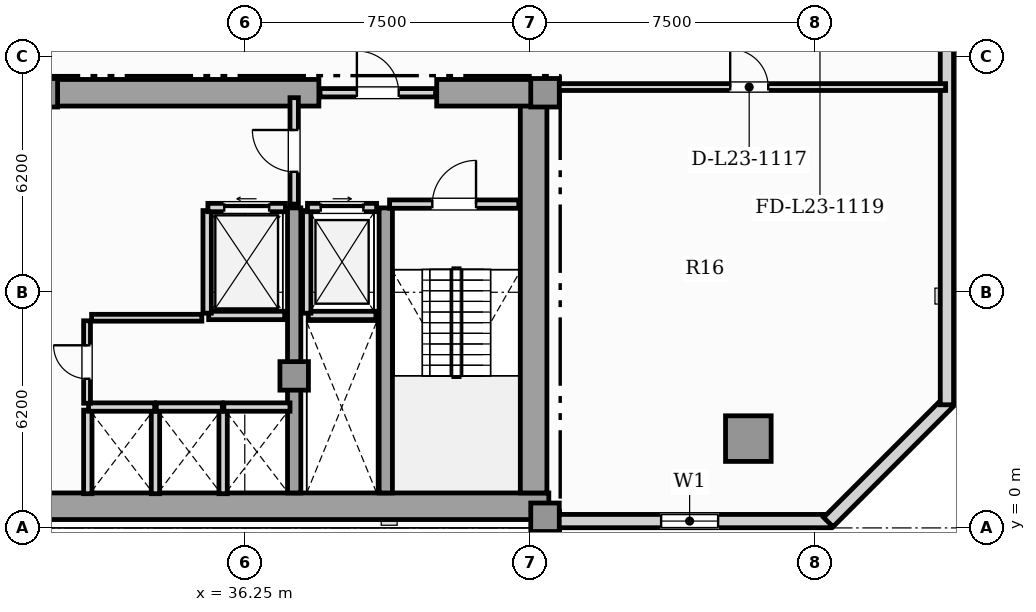
"""IFC4 building model, lengths in metres.
Left out: names, types, materials, properties, quantities, classifications, styles, units other than length and angle.
Written with IfcOpenShell. Run it as: python <this file> out.ifc"""

import sys

from ifc_helpers import new_model, si_unit, direction, frame, frame_2d, origin, origin_2d, place, context, subcontext, project, spatial, rectangle, hollow_rectangle, extrude, element, fill, save


model = new_model("IFC4")
c1 = context("Model", 3, precision=1e-05, world=origin(), true_north=direction((0.0, 1.0)))
c2 = subcontext(c1, "Body", "Model", "MODEL_VIEW")
j1 = project(units=[si_unit("LENGTHUNIT", "METRE"), si_unit("PLANEANGLEUNIT", "RADIAN")], contexts=[c1])
p1 = place(None, origin())
s1 = spatial("IfcSite", under=j1, at=p1, CompositionType="ELEMENT")
p2 = place(p1, origin())
s2 = spatial("IfcBuilding", under=s1, at=p2, CompositionType="ELEMENT")
p3 = place(p2, frame((0.0, 0.0, 96.45)))
s3 = spatial("IfcBuildingStorey", under=s2, at=p3, CompositionType="ELEMENT", Elevation=96.45)
p4 = place(p3, frame((13.25, 0.57, 0.0), z_axis=(0.0, 0.0, 1.0), x_axis=(1.0, 0.0, 0.0)))
e1 = element("IfcWall", 1, at=p4, inside=s3, PredefinedType="SHEAR", context=c2, shape_type="SweptSolid", body=[
    extrude(rectangle(XDim=31.0, YDim=0.7, at=frame_2d((15.5, 0.0))), origin(), (0.0, 0.0, 1.0), 3.6),
])
p5 = place(p3, frame((43.85, 0.92, 0.0), z_axis=(0.0, 0.0, 1.0), x_axis=(0.0, 1.0, 0.0)))
e2 = element("IfcWall", 2, at=p5, inside=s3, PredefinedType="SHEAR", context=c2, shape_type="SweptSolid", body=[
    extrude(rectangle(XDim=10.53, YDim=0.7, at=frame_2d((5.265, 0.0))), origin(), (0.0, 0.0, 1.0), 3.6),
])
p6 = place(p3, frame((30.9, 11.45, 0.0), z_axis=(0.0, 0.0, 1.0), x_axis=(1.0, 0.0, 0.0)))
e3 = element("IfcWall", 3, at=p6, inside=s3, PredefinedType="SHEAR", context=c2, shape_type="SweptSolid", body=[
    extrude(rectangle(XDim=7.3, YDim=0.7, at=frame_2d((3.65, 0.0))), origin(), (0.0, 0.0, 1.0), 3.6),
])
p7 = place(p3, frame((41.3, 11.45, 0.0), z_axis=(0.0, 0.0, 1.0), x_axis=(1.0, 0.0, 0.0)))
e4 = element("IfcWall", 4, at=p7, inside=s3, PredefinedType="SHEAR", context=c2, shape_type="SweptSolid", body=[
    extrude(rectangle(XDim=2.95, YDim=0.7, at=frame_2d((1.475, 0.0))), origin(), (0.0, 0.0, 1.0), 3.6),
])
for number, where, z_axis, x_axis in (
    (5, (37.55, 0.92, 0.0), (0.0, 0.0, 1.0), (0.0, 1.0, 0.0)),
    (6, (39.96, 0.92, 0.0), (0.0, 0.0, 1.0), (0.0, 1.0, 0.0)),
):
    element("IfcWall", number, at=place(p3, frame(where, z_axis=z_axis, x_axis=x_axis)), inside=s3, PredefinedType="SHEAR", context=c2, shape_type="SweptSolid", body=[
        extrude(rectangle(XDim=7.5, YDim=0.35, at=frame_2d((3.75, 0.0))), origin(), (0.0, 0.0, 1.0), 3.6),
    ])
for number, where, z_axis, x_axis in (
    (7, (44.15, 0.28, 0.0), (0.0, 0.0, 1.0), (1.0, 0.0, 0.0)),
    (8, (44.15, 11.45, 0.0), (0.0, 0.0, 1.0), (1.0, 0.0, 0.0)),
    (9, (37.55, 4.0, 0.0), (0.0, 0.0, 1.0), (1.0, 0.0, 0.0)),
    (10, (30.95, 11.45, 0.0), (0.0, 0.0, 1.0), (1.0, 0.0, 0.0)),
):
    element("IfcColumn", number, at=place(p3, frame(where, z_axis=z_axis, x_axis=x_axis)), inside=s3, PredefinedType="COLUMN", context=c2, shape_type="SweptSolid", body=[
        extrude(rectangle(XDim=0.75, YDim=0.75, at=origin_2d()), origin(), (0.0, 0.0, 1.0), 3.85),
    ])
p8 = place(p3, frame((49.5, 2.35, 0.0), z_axis=(0.0, 0.0, 1.0), x_axis=(1.0, 0.0, 0.0)))
e11 = element("IfcColumn", 11, at=p8, inside=s3, PredefinedType="USERDEFINED", context=c2, shape_type="SweptSolid", body=[
    extrude(hollow_rectangle(XDim=1.2, YDim=1.2, WallThickness=0.07, at=origin_2d()), origin(), (0.0, 0.0, 1.0), 3.85),
])
p9 = place(p3, frame((44.25, 0.18, 0.0), z_axis=(0.0, 0.0, 1.0), x_axis=(1.0, 0.0, 0.0)))
e12 = element("IfcWall", 12, at=p9, inside=s3, PredefinedType="SOLIDWALL", context=c2, shape_type="SweptSolid", body=[
    extrude(rectangle(XDim=7.41, YDim=0.35, at=frame_2d((3.705, 0.0))), origin(), (0.0, 0.0, 1.0), 3.6),
])
p10 = place(p9, frame((2.955, 0.0, 0.9)))
e13 = element("IfcOpeningElement", 13, at=p10, cuts=e12, PredefinedType="OPENING", context=c2, shape_type="SweptSolid", body=[
    extrude(rectangle(XDim=1.5, YDim=1.95, at=frame_2d((0.75, 0.975))), frame((0.0, 0.185, 0.0), z_axis=(0.0, -1.0, 0.0), x_axis=(1.0, 0.0, 0.0)), (0.0, 0.0, 1.0), 0.37),
])
p11 = place(p3, frame((51.604, 0.152, 0.0), z_axis=(0.0, 0.0, 1.0), x_axis=(0.707134240044, 0.707079321262, 0.0)))
e14 = element("IfcWall", 14, at=p11, inside=s3, PredefinedType="SOLIDWALL", context=c2, shape_type="SweptSolid", body=[
    extrude(rectangle(XDim=4.446, YDim=0.35, at=frame_2d((2.223, 0.0))), origin(), (0.0, 0.0, 1.0), 3.6),
])
p12 = place(p3, frame((54.725, 3.24, 0.0), z_axis=(0.0, 0.0, 1.0), x_axis=(0.0, 1.0, 0.0)))
e15 = element("IfcWall", 15, at=p12, inside=s3, PredefinedType="SOLIDWALL", context=c2, shape_type="SweptSolid", body=[
    extrude(rectangle(XDim=20.47, YDim=0.35, at=frame_2d((10.235, 0.0))), origin(), (0.0, 0.0, 1.0), 3.6),
])
p13 = place(p12, frame((12.74, 0.0, 0.9)))
e16 = element("IfcOpeningElement", 16, at=p13, cuts=e15, PredefinedType="OPENING", context=c2, shape_type="SweptSolid", body=[
    extrude(rectangle(XDim=1.5, YDim=1.95, at=frame_2d((0.75, 0.975))), frame((0.0, 0.185, 0.0), z_axis=(0.0, -1.0, 0.0), x_axis=(1.0, 0.0, 0.0)), (0.0, 0.0, 1.0), 0.37),
])
p14 = place(p3, frame((37.92, 5.59, 0.0), z_axis=(0.0, 0.0, 1.0), x_axis=(1.0, 0.0, 0.0)))
e17 = element("IfcWall", 17, at=p14, inside=s3, PredefinedType="SOLIDWALL", context=c2, shape_type="SweptSolid", body=[
    extrude(rectangle(XDim=1.78, YDim=0.22, at=frame_2d((0.89, 0.0))), origin(), (0.0, 0.0, 1.0), 3.6),
])
p15 = place(p3, frame((37.88, 5.65, 0.0), z_axis=(0.0, 0.0, 1.0), x_axis=(0.0, 1.0, 0.0)))
e18 = element("IfcWall", 18, at=p15, inside=s3, PredefinedType="SOLIDWALL", context=c2, shape_type="SweptSolid", body=[
    extrude(rectangle(XDim=2.7, YDim=0.22, at=frame_2d((1.35, 0.0))), origin(), (0.0, 0.0, 1.0), 3.6),
])
p16 = place(p3, frame((37.9, 8.43, 0.0), z_axis=(0.0, 0.0, 1.0), x_axis=(1.0, 0.0, 0.0)))
e19 = element("IfcWall", 19, at=p16, inside=s3, PredefinedType="SOLIDWALL", context=c2, shape_type="SweptSolid", body=[
    extrude(rectangle(XDim=1.82, YDim=0.22, at=frame_2d((0.91, 0.0))), origin(), (0.0, 0.0, 1.0), 3.6),
])
p17 = place(p16, frame((0.35, 0.0, 0.0)))
e20 = element("IfcOpeningElement", 20, at=p17, cuts=e19, PredefinedType="OPENING", context=c2, shape_type="SweptSolid", body=[
    extrude(rectangle(XDim=1.12, YDim=2.25, at=frame_2d((0.56, 1.125))), frame((0.0, 0.12, 0.0), z_axis=(0.0, -1.0, 0.0), x_axis=(1.0, 0.0, 0.0)), (0.0, 0.0, 1.0), 0.24),
])
p18 = place(p3, frame((35.3, 5.59, 0.0), z_axis=(0.0, 0.0, 1.0), x_axis=(1.0, 0.0, 0.0)))
e21 = element("IfcWall", 21, at=p18, inside=s3, PredefinedType="SOLIDWALL", context=c2, shape_type="SweptSolid", body=[
    extrude(rectangle(XDim=2.0, YDim=0.22, at=frame_2d((1.0, 0.0))), origin(), (0.0, 0.0, 1.0), 3.6),
])
p19 = place(p3, frame((35.26, 5.65, 0.0), z_axis=(0.0, 0.0, 1.0), x_axis=(0.0, 1.0, 0.0)))
e22 = element("IfcWall", 22, at=p19, inside=s3, PredefinedType="SOLIDWALL", context=c2, shape_type="SweptSolid", body=[
    extrude(rectangle(XDim=2.7, YDim=0.22, at=frame_2d((1.35, 0.0))), origin(), (0.0, 0.0, 1.0), 3.6),
])
p20 = place(p3, frame((35.28, 8.43, 0.0), z_axis=(0.0, 0.0, 1.0), x_axis=(1.0, 0.0, 0.0)))
e23 = element("IfcWall", 23, at=p20, inside=s3, PredefinedType="SOLIDWALL", context=c2, shape_type="SweptSolid", body=[
    extrude(rectangle(XDim=2.04, YDim=0.22, at=frame_2d((1.02, 0.0))), origin(), (0.0, 0.0, 1.0), 3.6),
])
p21 = place(p20, frame((0.43, 0.0, 0.0)))
e24 = element("IfcOpeningElement", 24, at=p21, cuts=e23, PredefinedType="OPENING", context=c2, shape_type="SweptSolid", body=[
    extrude(rectangle(XDim=1.18, YDim=2.2, at=frame_2d((0.59, 1.1))), frame((0.0, 0.12, 0.0), z_axis=(0.0, -1.0, 0.0), x_axis=(1.0, 0.0, 0.0)), (0.0, 0.0, 1.0), 0.24),
])
for number, where, z_axis, x_axis in (
    (25, (32.12, 0.9, 0.0), (0.0, 0.0, 1.0), (0.0, 1.0, 0.0)),
    (26, (33.9, 0.9, 0.0), (0.0, 0.0, 1.0), (0.0, 1.0, 0.0)),
):
    element("IfcWall", number, at=place(p3, frame(where, z_axis=z_axis, x_axis=x_axis)), inside=s3, PredefinedType="SOLIDWALL", context=c2, shape_type="SweptSolid", body=[
        extrude(rectangle(XDim=2.2, YDim=0.22, at=frame_2d((1.1, 0.0))), origin(), (0.0, 0.0, 1.0), 3.6),
    ])
p22 = place(p3, frame((32.14, 3.18, 0.0), z_axis=(0.0, 0.0, 1.0), x_axis=(1.0, 0.0, 0.0)))
e27 = element("IfcWall", 27, at=p22, inside=s3, PredefinedType="SOLIDWALL", context=c2, shape_type="SweptSolid", body=[
    extrude(rectangle(XDim=1.74, YDim=0.22, at=frame_2d((0.87, 0.0))), origin(), (0.0, 0.0, 1.0), 3.6),
])
p23 = place(p3, frame((35.68, 0.9, 0.0), z_axis=(0.0, 0.0, 1.0), x_axis=(0.0, 1.0, 0.0)))
e28 = element("IfcWall", 28, at=p23, inside=s3, PredefinedType="SOLIDWALL", context=c2, shape_type="SweptSolid", body=[
    extrude(rectangle(XDim=2.2, YDim=0.22, at=frame_2d((1.1, 0.0))), origin(), (0.0, 0.0, 1.0), 3.6),
])
for number, where, z_axis, x_axis in (
    (29, (33.92, 3.18, 0.0), (0.0, 0.0, 1.0), (1.0, 0.0, 0.0)),
    (30, (35.7, 3.18, 0.0), (0.0, 0.0, 1.0), (1.0, 0.0, 0.0)),
):
    element("IfcWall", number, at=place(p3, frame(where, z_axis=z_axis, x_axis=x_axis)), inside=s3, PredefinedType="SOLIDWALL", context=c2, shape_type="SweptSolid", body=[
        extrude(rectangle(XDim=1.74, YDim=0.22, at=frame_2d((0.87, 0.0))), origin(), (0.0, 0.0, 1.0), 3.6),
    ])
p24 = place(p3, frame((40.06, 8.52, 0.0), z_axis=(0.0, 0.0, 1.0), x_axis=(1.0, 0.0, 0.0)))
e31 = element("IfcWall", 31, at=p24, inside=s3, PredefinedType="SOLIDWALL", context=c2, shape_type="SweptSolid", body=[
    extrude(rectangle(XDim=3.4, YDim=0.22, at=frame_2d((1.7, 0.0))), origin(), (0.0, 0.0, 1.0), 3.6),
])
p25 = place(p24, frame((1.125, 0.0, 0.0)))
e32 = element("IfcOpeningElement", 32, at=p25, cuts=e31, PredefinedType="OPENING", context=c2, shape_type="SweptSolid", body=[
    extrude(rectangle(XDim=1.15, YDim=2.2, at=frame_2d((0.575, 1.1))), frame((0.0, 0.12, 0.0), z_axis=(0.0, -1.0, 0.0), x_axis=(1.0, 0.0, 0.0)), (0.0, 0.0, 1.0), 0.24),
])
p26 = place(p3, frame((37.55, 8.52, 0.0), z_axis=(0.0, 0.0, 1.0), x_axis=(0.0, 1.0, 0.0)))
e33 = element("IfcWall", 33, at=p26, inside=s3, PredefinedType="SOLIDWALL", context=c2, shape_type="SweptSolid", body=[
    extrude(rectangle(XDim=2.8, YDim=0.22, at=frame_2d((1.4, 0.0))), origin(), (0.0, 0.0, 1.0), 3.056),
])
p27 = place(p26, frame((0.85, 0.0, 0.0)))
e34 = element("IfcOpeningElement", 34, at=p27, cuts=e33, PredefinedType="OPENING", context=c2, shape_type="SweptSolid", body=[
    extrude(rectangle(XDim=1.1, YDim=2.2, at=frame_2d((0.55, 1.1))), frame((0.0, 0.12, 0.0), z_axis=(0.0, -1.0, 0.0), x_axis=(1.0, 0.0, 0.0)), (0.0, 0.0, 1.0), 0.24),
])
p28 = place(p3, frame((38.23, 11.45, 0.0), z_axis=(0.0, 0.0, 1.0), x_axis=(1.0, 0.0, 0.0)))
e35 = element("IfcWall", 35, at=p28, inside=s3, PredefinedType="SOLIDWALL", context=c2, shape_type="SweptSolid", body=[
    extrude(rectangle(XDim=3.04, YDim=0.22, at=frame_2d((1.52, 0.0))), origin(), (0.0, 0.0, 1.0), 3.6),
])
p29 = place(p28, frame((0.97, 0.0, 0.0)))
e36 = element("IfcOpeningElement", 36, at=p29, cuts=e35, PredefinedType="OPENING", context=c2, shape_type="SweptSolid", body=[
    extrude(rectangle(XDim=1.1, YDim=2.2, at=frame_2d((0.55, 1.1))), frame((0.0, 0.12, 0.0), z_axis=(0.0, -1.0, 0.0), x_axis=(1.0, 0.0, 0.0)), (0.0, 0.0, 1.0), 0.24),
])
p30 = place(p3, frame((32.1, 3.28, 0.0), z_axis=(0.0, 0.0, 1.0), x_axis=(0.0, 1.0, 0.0)))
e37 = element("IfcWall", 37, at=p30, inside=s3, PredefinedType="PARTITIONING", context=c2, shape_type="SweptSolid", body=[
    extrude(rectangle(XDim=2.17, YDim=0.18, at=frame_2d((1.085, 0.0))), origin(), (0.0, 0.0, 1.0), 3.6),
])
p31 = place(p30, frame((0.645, 0.0, 0.0)))
e38 = element("IfcOpeningElement", 38, at=p31, cuts=e37, PredefinedType="OPENING", context=c2, shape_type="SweptSolid", body=[
    extrude(rectangle(XDim=0.88, YDim=2.05, at=frame_2d((0.44, 1.025))), frame((0.0, 0.1, 0.0), z_axis=(0.0, -1.0, 0.0), x_axis=(1.0, 0.0, 0.0)), (0.0, 0.0, 1.0), 0.2),
])
p32 = place(p3, frame((32.22, 5.53, 0.0), z_axis=(0.0, 0.0, 1.0), x_axis=(1.0, 0.0, 0.0)))
e39 = element("IfcWall", 39, at=p32, inside=s3, PredefinedType="PARTITIONING", context=c2, shape_type="SweptSolid", body=[
    extrude(rectangle(XDim=2.9, YDim=0.18, at=frame_2d((1.45, 0.0))), origin(), (0.0, 0.0, 1.0), 3.6),
])
p33 = place(p3, frame((44.355, 11.6, 0.0), z_axis=(0.0, 0.0, 1.0), x_axis=(1.0, 0.0, 0.0)))
e40 = element("IfcWall", 40, at=p33, inside=s3, PredefinedType="PARTITIONING", context=c2, shape_type="SweptSolid", body=[
    extrude(rectangle(XDim=10.335, YDim=0.18, at=frame_2d((5.167, 0.0))), origin(), (0.0, 0.0, 1.0), 3.6),
])
p34 = place(p33, frame((4.667, 0.0, 0.0)))
e41 = element("IfcOpeningElement", 41, at=p34, cuts=e40, PredefinedType="OPENING", context=c2, shape_type="SweptSolid", body=[
    extrude(rectangle(XDim=1.0, YDim=2.15, at=frame_2d((0.5, 1.075))), frame((0.0, 0.1, 0.0), z_axis=(0.0, -1.0, 0.0), x_axis=(1.0, 0.0, 0.0)), (0.0, 0.0, 1.0), 0.2),
])
p35 = place(p10, origin())
e42 = element("IfcWindow", 42, at=p35, inside=s3, PartitioningType="SINGLE_PANEL", PredefinedType="WINDOW", context=c2, shape_type="SweptSolid", body=[
    extrude(rectangle(XDim=1.5, YDim=1.95, at=frame_2d((0.75, 0.975))), frame((0.0, 0.03, 0.0), z_axis=(0.0, -1.0, 0.0), x_axis=(1.0, 0.0, 0.0)), (0.0, 0.0, 1.0), 0.06),
])
fill(e13, e42)
p36 = place(p17, origin())
e43 = element("IfcDoor", 43, at=p36, inside=s3, OperationType="SLIDING_TO_RIGHT", PredefinedType="DOOR", context=c2, shape_type="SweptSolid", body=[
    extrude(rectangle(XDim=1.12, YDim=2.25, at=frame_2d((0.56, 1.125))), frame((0.0, 0.025, 0.0), z_axis=(0.0, -1.0, 0.0), x_axis=(1.0, 0.0, 0.0)), (0.0, 0.0, 1.0), 0.05),
])
fill(e20, e43)
p37 = place(p21, origin())
e44 = element("IfcDoor", 44, at=p37, inside=s3, OperationType="SLIDING_TO_LEFT", PredefinedType="DOOR", context=c2, shape_type="SweptSolid", body=[
    extrude(rectangle(XDim=1.18, YDim=2.2, at=frame_2d((0.59, 1.1))), frame((0.0, 0.025, 0.0), z_axis=(0.0, -1.0, 0.0), x_axis=(1.0, 0.0, 0.0)), (0.0, 0.0, 1.0), 0.05),
])
fill(e24, e44)
p38 = place(p25, origin())
e45 = element("IfcDoor", 45, at=p38, inside=s3, OperationType="SINGLE_SWING_RIGHT", PredefinedType="DOOR", context=c2, shape_type="SweptSolid", body=[
    extrude(rectangle(XDim=1.15, YDim=2.2, at=frame_2d((0.575, 1.1))), frame((0.0, 0.025, 0.0), z_axis=(0.0, -1.0, 0.0), x_axis=(1.0, 0.0, 0.0)), (0.0, 0.0, 1.0), 0.05),
])
fill(e32, e45)
p39 = place(p27, origin())
e46 = element("IfcDoor", 46, at=p39, inside=s3, OperationType="SINGLE_SWING_RIGHT", PredefinedType="DOOR", context=c2, shape_type="SweptSolid", body=[
    extrude(rectangle(XDim=1.1, YDim=2.2, at=frame_2d((0.55, 1.1))), frame((0.0, 0.025, 0.0), z_axis=(0.0, -1.0, 0.0), x_axis=(1.0, 0.0, 0.0)), (0.0, 0.0, 1.0), 0.05),
])
fill(e34, e46)
p40 = place(p29, origin())
e47 = element("IfcDoor", 47, at=p40, inside=s3, OperationType="SINGLE_SWING_LEFT", PredefinedType="DOOR", context=c2, shape_type="SweptSolid", body=[
    extrude(rectangle(XDim=1.1, YDim=2.2, at=frame_2d((0.55, 1.1))), frame((0.0, 0.025, 0.0), z_axis=(0.0, -1.0, 0.0), x_axis=(1.0, 0.0, 0.0)), (0.0, 0.0, 1.0), 0.05),
])
fill(e36, e47)
p41 = place(p31, origin())
e48 = element("IfcDoor", 48, at=p41, inside=s3, OperationType="SINGLE_SWING_RIGHT", PredefinedType="DOOR", context=c2, shape_type="SweptSolid", body=[
    extrude(rectangle(XDim=0.88, YDim=2.05, at=frame_2d((0.44, 1.025))), frame((0.0, 0.025, 0.0), z_axis=(0.0, -1.0, 0.0), x_axis=(1.0, 0.0, 0.0)), (0.0, 0.0, 1.0), 0.05),
])
fill(e38, e48)
p42 = place(p34, origin())
e49 = element("IfcDoor", 49, at=p42, inside=s3, OperationType="SINGLE_SWING_LEFT", PredefinedType="DOOR", context=c2, shape_type="SweptSolid", body=[
    extrude(rectangle(XDim=1.0, YDim=2.15, at=frame_2d((0.5, 1.075))), frame((0.0, 0.025, 0.0), z_axis=(0.0, -1.0, 0.0), x_axis=(1.0, 0.0, 0.0)), (0.0, 0.0, 1.0), 0.05),
])
fill(e41, e49)
save(model, sys.argv[1])
